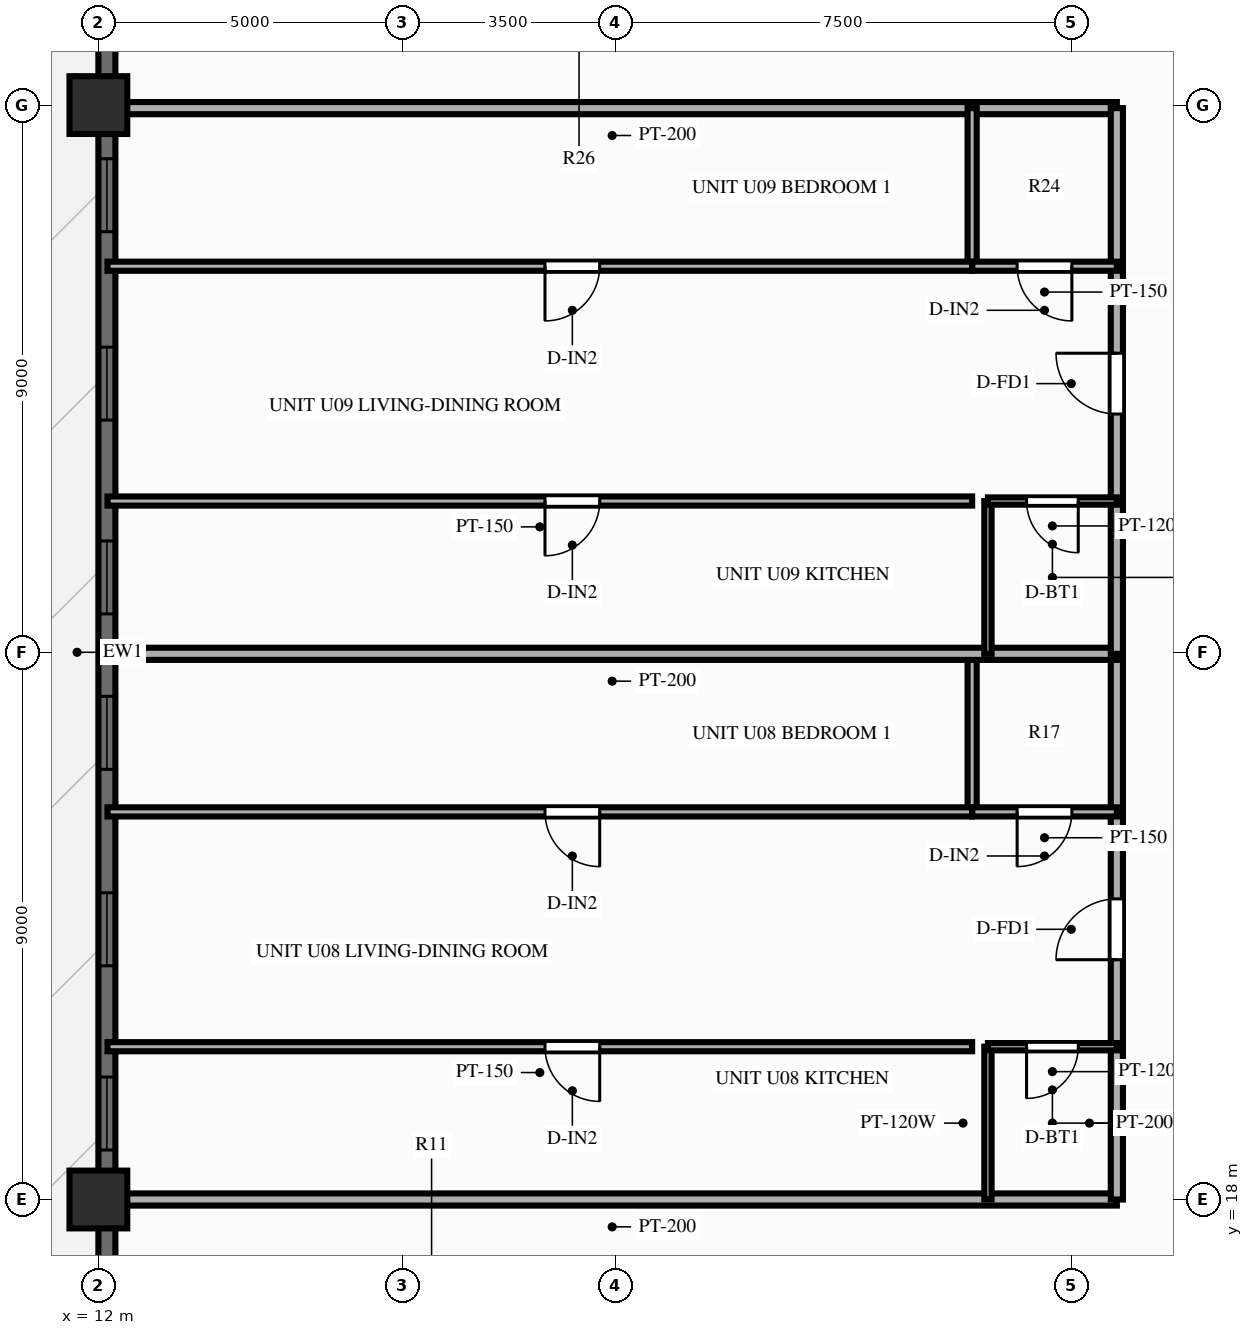
"""IFC4 building model, lengths in metres.
Left out: names, types, materials, properties, quantities, classifications, styles, units other than length and angle.
Written with IfcOpenShell. Run it as: python <this file> out.ifc"""

import sys

from ifc_helpers import new_model, si_unit, direction, frame, frame_2d, origin, origin_2d, place, context, subcontext, project, spatial, rectangle, extrude, source, transform, mapped, element, fill, save


model = new_model("IFC4")
c1 = context("Model", 3, precision=1e-05, world=origin(), true_north=direction((0.0, 1.0)))
c2 = subcontext(c1, "Body", "Model", "MODEL_VIEW")
j1 = project(units=[si_unit("LENGTHUNIT", "METRE"), si_unit("PLANEANGLEUNIT", "RADIAN")], contexts=[c1])
p1 = place(None, origin())
s1 = spatial("IfcSite", under=j1, at=p1, CompositionType="ELEMENT")
p2 = place(p1, origin())
s2 = spatial("IfcBuilding", under=s1, at=p2, CompositionType="ELEMENT")
p3 = place(p2, frame((0.0, 0.0, 80.85)))
s3 = spatial("IfcBuildingStorey", under=s2, at=p3, CompositionType="ELEMENT", Elevation=80.85)
m1 = source(origin(), c2, "Body", "SweptSolid", [
    extrude(rectangle(XDim=0.95, YDim=0.95, at=origin_2d()), origin(), (0.0, 0.0, 1.0), 3.0),
])
for number, where, z_axis, x_axis in (
    (1, (12.0, 36.0, 0.0), (0.0, 0.0, 1.0), (1.0, 0.0, 0.0)),
    (2, (12.0, 18.0, 0.0), (0.0, 0.0, 1.0), (1.0, 0.0, 0.0)),
):
    element("IfcColumn", number, at=place(p3, frame(where, z_axis=z_axis, x_axis=x_axis)), inside=s3, PredefinedType="COLUMN", context=c2, shape_type="MappedRepresentation", body=[
        mapped(m1, transform((0.0, 0.0, 0.0), scale=1.0)),
    ])
p4 = place(p3, frame((12.14, 7.2, 0.0), z_axis=(0.0, 0.0, 1.0), x_axis=(0.0, 1.0, 0.0)))
e3 = element("IfcWall", 3, at=p4, inside=s3, PredefinedType="SOLIDWALL", context=c2, shape_type="SweptSolid", body=[
    extrude(rectangle(XDim=39.6, YDim=0.28, at=frame_2d((19.8, 0.0))), origin(), (0.0, 0.0, 1.0), 2.28),
])
p5 = place(p4, frame((4.6, 0.0, 0.0)))
e4 = element("IfcOpeningElement", 4, at=p5, cuts=e3, PredefinedType="OPENING", context=c2, shape_type="SweptSolid", body=[
    extrude(rectangle(XDim=1.6, YDim=2.15, at=frame_2d((0.8, 1.075))), frame((0.0, 0.152, 0.0), z_axis=(0.0, -1.0, 0.0), x_axis=(1.0, 0.0, 0.0)), (0.0, 0.0, 1.0), 0.304),
])
p6 = place(p4, frame((11.614, 0.0, 0.25)))
e5 = element("IfcOpeningElement", 5, at=p6, cuts=e3, PredefinedType="OPENING", context=c2, shape_type="SweptSolid", body=[
    extrude(rectangle(XDim=1.2, YDim=1.5, at=frame_2d((0.6, 0.75))), frame((0.0, 0.152, 0.0), z_axis=(0.0, -1.0, 0.0), x_axis=(1.0, 0.0, 0.0)), (0.0, 0.0, 1.0), 0.304),
])
p7 = place(p4, frame((14.644, 0.0, 0.25)))
e6 = element("IfcOpeningElement", 6, at=p7, cuts=e3, PredefinedType="OPENING", context=c2, shape_type="SweptSolid", body=[
    extrude(rectangle(XDim=1.2, YDim=1.5, at=frame_2d((0.6, 0.75))), frame((0.0, 0.152, 0.0), z_axis=(0.0, -1.0, 0.0), x_axis=(1.0, 0.0, 0.0)), (0.0, 0.0, 1.0), 0.304),
])
p8 = place(p4, frame((17.875, 0.0, 0.25)))
e7 = element("IfcOpeningElement", 7, at=p8, cuts=e3, PredefinedType="OPENING", context=c2, shape_type="SweptSolid", body=[
    extrude(rectangle(XDim=1.2, YDim=1.5, at=frame_2d((0.6, 0.75))), frame((0.0, 0.152, 0.0), z_axis=(0.0, -1.0, 0.0), x_axis=(1.0, 0.0, 0.0)), (0.0, 0.0, 1.0), 0.304),
])
p9 = place(p4, frame((20.431, 0.0, 0.25)))
e8 = element("IfcOpeningElement", 8, at=p9, cuts=e3, PredefinedType="OPENING", context=c2, shape_type="SweptSolid", body=[
    extrude(rectangle(XDim=1.2, YDim=1.5, at=frame_2d((0.6, 0.75))), frame((0.0, 0.152, 0.0), z_axis=(0.0, -1.0, 0.0), x_axis=(1.0, 0.0, 0.0)), (0.0, 0.0, 1.0), 0.304),
])
p10 = place(p4, frame((23.619, 0.0, 0.25)))
e9 = element("IfcOpeningElement", 9, at=p10, cuts=e3, PredefinedType="OPENING", context=c2, shape_type="SweptSolid", body=[
    extrude(rectangle(XDim=1.2, YDim=1.5, at=frame_2d((0.6, 0.75))), frame((0.0, 0.152, 0.0), z_axis=(0.0, -1.0, 0.0), x_axis=(1.0, 0.0, 0.0)), (0.0, 0.0, 1.0), 0.304),
])
p11 = place(p4, frame((26.718, 0.0, 0.25)))
e10 = element("IfcOpeningElement", 10, at=p11, cuts=e3, PredefinedType="OPENING", context=c2, shape_type="SweptSolid", body=[
    extrude(rectangle(XDim=1.2, YDim=1.5, at=frame_2d((0.6, 0.75))), frame((0.0, 0.152, 0.0), z_axis=(0.0, -1.0, 0.0), x_axis=(1.0, 0.0, 0.0)), (0.0, 0.0, 1.0), 0.304),
])
p12 = place(p4, frame((33.6, 0.0, 0.25)))
e11 = element("IfcOpeningElement", 11, at=p12, cuts=e3, PredefinedType="OPENING", context=c2, shape_type="SweptSolid", body=[
    extrude(rectangle(XDim=1.2, YDim=1.5, at=frame_2d((0.6, 0.75))), frame((0.0, 0.152, 0.0), z_axis=(0.0, -1.0, 0.0), x_axis=(1.0, 0.0, 0.0)), (0.0, 0.0, 1.0), 0.304),
])
for number, where, z_axis, x_axis in (
    (12, (28.75, 18.0, 0.0), (0.0, 0.0, 1.0), (-1.0, 0.0, 0.0)),
    (13, (28.75, 35.95, 0.0), (0.0, 0.0, 1.0), (-1.0, 0.0, 0.0)),
):
    element("IfcWall", number, at=place(p3, frame(where, z_axis=z_axis, x_axis=x_axis)), inside=s3, PredefinedType="PARTITIONING", context=c2, shape_type="SweptSolid", body=[
        extrude(rectangle(XDim=16.6, YDim=0.2, at=frame_2d((8.3, 0.0))), origin(), (0.0, 0.0, 1.0), 2.34),
    ])
p13 = place(p3, frame((28.75, 18.0, 0.0), z_axis=(0.0, 0.0, 1.0), x_axis=(0.0, 1.0, 0.0)))
e14 = element("IfcWall", 14, at=p13, inside=s3, PredefinedType="PARTITIONING", context=c2, shape_type="SweptSolid", body=[
    extrude(rectangle(XDim=2.513, YDim=0.2, at=frame_2d((1.256, 0.0))), origin(), (0.0, 0.0, 1.0), 2.79),
])
p14 = place(p3, frame((28.75, 20.513, 0.0), z_axis=(0.0, 0.0, 1.0), x_axis=(0.0, 1.0, 0.0)))
e15 = element("IfcWall", 15, at=p14, inside=s3, PredefinedType="PARTITIONING", context=c2, shape_type="SweptSolid", body=[
    extrude(rectangle(XDim=3.862, YDim=0.2, at=frame_2d((1.931, 0.0))), origin(), (0.0, 0.0, 1.0), 2.79),
])
p15 = place(p14, frame((1.431, 0.0, 0.0)))
e16 = element("IfcOpeningElement", 16, at=p15, cuts=e15, PredefinedType="OPENING", context=c2, shape_type="SweptSolid", body=[
    extrude(rectangle(XDim=1.0, YDim=2.15, at=frame_2d((0.5, 1.075))), frame((0.0, 0.112, 0.0), z_axis=(0.0, -1.0, 0.0), x_axis=(1.0, 0.0, 0.0)), (0.0, 0.0, 1.0), 0.224),
])
p16 = place(p3, frame((28.75, 24.375, 0.0), z_axis=(0.0, 0.0, 1.0), x_axis=(0.0, 1.0, 0.0)))
e17 = element("IfcWall", 17, at=p16, inside=s3, PredefinedType="PARTITIONING", context=c2, shape_type="SweptSolid", body=[
    extrude(rectangle(XDim=2.6, YDim=0.2, at=frame_2d((1.3, 0.0))), origin(), (0.0, 0.0, 1.0), 2.79),
])
p17 = place(p3, frame((26.63, 18.0, 0.0), z_axis=(0.0, 0.0, 1.0), x_axis=(0.0, 1.0, 0.0)))
e18 = element("IfcWall", 18, at=p17, inside=s3, PredefinedType="PARTITIONING", context=c2, shape_type="SweptSolid", body=[
    extrude(rectangle(XDim=2.513, YDim=0.12, at=frame_2d((1.256, 0.0))), origin(), (0.0, 0.0, 1.0), 2.79),
])
p18 = place(p3, frame((26.37, 24.375, 0.0), z_axis=(0.0, 0.0, 1.0), x_axis=(0.0, 1.0, 0.0)))
e19 = element("IfcWall", 19, at=p18, inside=s3, PredefinedType="PARTITIONING", context=c2, shape_type="SweptSolid", body=[
    extrude(rectangle(XDim=2.6, YDim=0.15, at=frame_2d((1.3, 0.0))), origin(), (0.0, 0.0, 1.0), 2.79),
])
p19 = place(p3, frame((28.75, 20.513, 0.0), z_axis=(0.0, 0.0, 1.0), x_axis=(-1.0, 0.0, 0.0)))
e20 = element("IfcWall", 20, at=p19, inside=s3, PredefinedType="PARTITIONING", context=c2, shape_type="SweptSolid", body=[
    extrude(rectangle(XDim=2.12, YDim=0.12, at=frame_2d((1.06, 0.0))), origin(), (0.0, 0.0, 1.0), 2.79),
])
p20 = place(p19, frame((0.635, 0.0, 0.0)))
e21 = element("IfcOpeningElement", 21, at=p20, cuts=e20, PredefinedType="OPENING", context=c2, shape_type="SweptSolid", body=[
    extrude(rectangle(XDim=0.85, YDim=2.05, at=frame_2d((0.425, 1.025))), frame((0.0, 0.072, 0.0), z_axis=(0.0, -1.0, 0.0), x_axis=(1.0, 0.0, 0.0)), (0.0, 0.0, 1.0), 0.144),
])
p21 = place(p3, frame((26.37, 20.513, 0.0), z_axis=(0.0, 0.0, 1.0), x_axis=(-1.0, 0.0, 0.0)))
e22 = element("IfcWall", 22, at=p21, inside=s3, PredefinedType="PARTITIONING", context=c2, shape_type="SweptSolid", body=[
    extrude(rectangle(XDim=14.22, YDim=0.15, at=frame_2d((7.11, 0.0))), origin(), (0.0, 0.0, 1.0), 2.79),
])
p22 = place(p21, frame((6.125, 0.0, 0.0)))
e23 = element("IfcOpeningElement", 23, at=p22, cuts=e22, PredefinedType="OPENING", context=c2, shape_type="SweptSolid", body=[
    extrude(rectangle(XDim=0.9, YDim=2.1, at=frame_2d((0.45, 1.05))), frame((0.0, 0.087, 0.0), z_axis=(0.0, -1.0, 0.0), x_axis=(1.0, 0.0, 0.0)), (0.0, 0.0, 1.0), 0.174),
])
p23 = place(p3, frame((28.75, 24.375, 0.0), z_axis=(0.0, 0.0, 1.0), x_axis=(-1.0, 0.0, 0.0)))
e24 = element("IfcWall", 24, at=p23, inside=s3, PredefinedType="PARTITIONING", context=c2, shape_type="SweptSolid", body=[
    extrude(rectangle(XDim=2.38, YDim=0.15, at=frame_2d((1.19, 0.0))), origin(), (0.0, 0.0, 1.0), 2.79),
])
p24 = place(p23, frame((0.74, 0.0, 0.0)))
e25 = element("IfcOpeningElement", 25, at=p24, cuts=e24, PredefinedType="OPENING", context=c2, shape_type="SweptSolid", body=[
    extrude(rectangle(XDim=0.9, YDim=2.1, at=frame_2d((0.45, 1.05))), frame((0.0, 0.087, 0.0), z_axis=(0.0, -1.0, 0.0), x_axis=(1.0, 0.0, 0.0)), (0.0, 0.0, 1.0), 0.174),
])
p25 = place(p3, frame((26.37, 24.375, 0.0), z_axis=(0.0, 0.0, 1.0), x_axis=(-1.0, 0.0, 0.0)))
e26 = element("IfcWall", 26, at=p25, inside=s3, PredefinedType="PARTITIONING", context=c2, shape_type="SweptSolid", body=[
    extrude(rectangle(XDim=14.22, YDim=0.15, at=frame_2d((7.11, 0.0))), origin(), (0.0, 0.0, 1.0), 2.79),
])
p26 = place(p25, frame((6.125, 0.0, 0.0)))
e27 = element("IfcOpeningElement", 27, at=p26, cuts=e26, PredefinedType="OPENING", context=c2, shape_type="SweptSolid", body=[
    extrude(rectangle(XDim=0.9, YDim=2.1, at=frame_2d((0.45, 1.05))), frame((0.0, 0.087, 0.0), z_axis=(0.0, -1.0, 0.0), x_axis=(1.0, 0.0, 0.0)), (0.0, 0.0, 1.0), 0.174),
])
p27 = place(p3, frame((28.75, 26.975, 0.0), z_axis=(0.0, 0.0, 1.0), x_axis=(-1.0, 0.0, 0.0)))
e28 = element("IfcWall", 28, at=p27, inside=s3, PredefinedType="PARTITIONING", context=c2, shape_type="SweptSolid", body=[
    extrude(rectangle(XDim=16.6, YDim=0.2, at=frame_2d((8.3, 0.0))), origin(), (0.0, 0.0, 1.0), 2.79),
])
p28 = place(p3, frame((28.75, 26.975, 0.0), z_axis=(0.0, 0.0, 1.0), x_axis=(0.0, 1.0, 0.0)))
e29 = element("IfcWall", 29, at=p28, inside=s3, PredefinedType="PARTITIONING", context=c2, shape_type="SweptSolid", body=[
    extrude(rectangle(XDim=2.513, YDim=0.2, at=frame_2d((1.256, 0.0))), origin(), (0.0, 0.0, 1.0), 2.79),
])
p29 = place(p3, frame((28.75, 29.488, 0.0), z_axis=(0.0, 0.0, 1.0), x_axis=(0.0, 1.0, 0.0)))
e30 = element("IfcWall", 30, at=p29, inside=s3, PredefinedType="PARTITIONING", context=c2, shape_type="SweptSolid", body=[
    extrude(rectangle(XDim=3.862, YDim=0.2, at=frame_2d((1.931, 0.0))), origin(), (0.0, 0.0, 1.0), 2.79),
])
p30 = place(p29, frame((1.431, 0.0, 0.0)))
e31 = element("IfcOpeningElement", 31, at=p30, cuts=e30, PredefinedType="OPENING", context=c2, shape_type="SweptSolid", body=[
    extrude(rectangle(XDim=1.0, YDim=2.15, at=frame_2d((0.5, 1.075))), frame((0.0, 0.112, 0.0), z_axis=(0.0, -1.0, 0.0), x_axis=(1.0, 0.0, 0.0)), (0.0, 0.0, 1.0), 0.224),
])
p31 = place(p3, frame((28.75, 33.35, 0.0), z_axis=(0.0, 0.0, 1.0), x_axis=(0.0, 1.0, 0.0)))
e32 = element("IfcWall", 32, at=p31, inside=s3, PredefinedType="PARTITIONING", context=c2, shape_type="SweptSolid", body=[
    extrude(rectangle(XDim=2.6, YDim=0.2, at=frame_2d((1.3, 0.0))), origin(), (0.0, 0.0, 1.0), 2.79),
])
p32 = place(p3, frame((26.63, 26.975, 0.0), z_axis=(0.0, 0.0, 1.0), x_axis=(0.0, 1.0, 0.0)))
e33 = element("IfcWall", 33, at=p32, inside=s3, PredefinedType="PARTITIONING", context=c2, shape_type="SweptSolid", body=[
    extrude(rectangle(XDim=2.513, YDim=0.12, at=frame_2d((1.256, 0.0))), origin(), (0.0, 0.0, 1.0), 2.79),
])
p33 = place(p3, frame((26.37, 33.35, 0.0), z_axis=(0.0, 0.0, 1.0), x_axis=(0.0, 1.0, 0.0)))
e34 = element("IfcWall", 34, at=p33, inside=s3, PredefinedType="PARTITIONING", context=c2, shape_type="SweptSolid", body=[
    extrude(rectangle(XDim=2.6, YDim=0.15, at=frame_2d((1.3, 0.0))), origin(), (0.0, 0.0, 1.0), 2.79),
])
p34 = place(p3, frame((28.75, 29.488, 0.0), z_axis=(0.0, 0.0, 1.0), x_axis=(-1.0, 0.0, 0.0)))
e35 = element("IfcWall", 35, at=p34, inside=s3, PredefinedType="PARTITIONING", context=c2, shape_type="SweptSolid", body=[
    extrude(rectangle(XDim=2.12, YDim=0.12, at=frame_2d((1.06, 0.0))), origin(), (0.0, 0.0, 1.0), 2.79),
])
p35 = place(p34, frame((0.635, 0.0, 0.0)))
e36 = element("IfcOpeningElement", 36, at=p35, cuts=e35, PredefinedType="OPENING", context=c2, shape_type="SweptSolid", body=[
    extrude(rectangle(XDim=0.85, YDim=2.05, at=frame_2d((0.425, 1.025))), frame((0.0, 0.072, 0.0), z_axis=(0.0, -1.0, 0.0), x_axis=(1.0, 0.0, 0.0)), (0.0, 0.0, 1.0), 0.144),
])
p36 = place(p3, frame((26.37, 29.488, 0.0), z_axis=(0.0, 0.0, 1.0), x_axis=(-1.0, 0.0, 0.0)))
e37 = element("IfcWall", 37, at=p36, inside=s3, PredefinedType="PARTITIONING", context=c2, shape_type="SweptSolid", body=[
    extrude(rectangle(XDim=14.22, YDim=0.15, at=frame_2d((7.11, 0.0))), origin(), (0.0, 0.0, 1.0), 2.79),
])
p37 = place(p36, frame((6.125, 0.0, 0.0)))
e38 = element("IfcOpeningElement", 38, at=p37, cuts=e37, PredefinedType="OPENING", context=c2, shape_type="SweptSolid", body=[
    extrude(rectangle(XDim=0.9, YDim=2.1, at=frame_2d((0.45, 1.05))), frame((0.0, 0.087, 0.0), z_axis=(0.0, -1.0, 0.0), x_axis=(1.0, 0.0, 0.0)), (0.0, 0.0, 1.0), 0.174),
])
p38 = place(p3, frame((28.75, 33.35, 0.0), z_axis=(0.0, 0.0, 1.0), x_axis=(-1.0, 0.0, 0.0)))
e39 = element("IfcWall", 39, at=p38, inside=s3, PredefinedType="PARTITIONING", context=c2, shape_type="SweptSolid", body=[
    extrude(rectangle(XDim=2.38, YDim=0.15, at=frame_2d((1.19, 0.0))), origin(), (0.0, 0.0, 1.0), 2.79),
])
p39 = place(p38, frame((0.74, 0.0, 0.0)))
e40 = element("IfcOpeningElement", 40, at=p39, cuts=e39, PredefinedType="OPENING", context=c2, shape_type="SweptSolid", body=[
    extrude(rectangle(XDim=0.9, YDim=2.1, at=frame_2d((0.45, 1.05))), frame((0.0, 0.087, 0.0), z_axis=(0.0, -1.0, 0.0), x_axis=(1.0, 0.0, 0.0)), (0.0, 0.0, 1.0), 0.174),
])
p40 = place(p3, frame((26.37, 33.35, 0.0), z_axis=(0.0, 0.0, 1.0), x_axis=(-1.0, 0.0, 0.0)))
e41 = element("IfcWall", 41, at=p40, inside=s3, PredefinedType="PARTITIONING", context=c2, shape_type="SweptSolid", body=[
    extrude(rectangle(XDim=14.22, YDim=0.15, at=frame_2d((7.11, 0.0))), origin(), (0.0, 0.0, 1.0), 2.79),
])
p41 = place(p40, frame((6.125, 0.0, 0.0)))
e42 = element("IfcOpeningElement", 42, at=p41, cuts=e41, PredefinedType="OPENING", context=c2, shape_type="SweptSolid", body=[
    extrude(rectangle(XDim=0.9, YDim=2.1, at=frame_2d((0.45, 1.05))), frame((0.0, 0.087, 0.0), z_axis=(0.0, -1.0, 0.0), x_axis=(1.0, 0.0, 0.0)), (0.0, 0.0, 1.0), 0.174),
])
m2 = source(origin(), c2, "Body", "SweptSolid", [
    extrude(rectangle(XDim=1.2, YDim=1.5, at=frame_2d((0.6, 0.75))), frame((0.0, 0.03, 0.0), z_axis=(0.0, -1.0, 0.0), x_axis=(1.0, 0.0, 0.0)), (0.0, 0.0, 1.0), 0.06),
])
p42 = place(p6, origin())
e43 = element("IfcWindow", 43, at=p42, inside=s3, PartitioningType="SINGLE_PANEL", PredefinedType="WINDOW", context=c2, shape_type="MappedRepresentation", body=[
    mapped(m2, transform((0.0, 0.0, 0.0), scale=1.0)),
])
fill(e5, e43)
p43 = place(p7, origin())
e44 = element("IfcWindow", 44, at=p43, inside=s3, PartitioningType="SINGLE_PANEL", PredefinedType="WINDOW", context=c2, shape_type="MappedRepresentation", body=[
    mapped(m2, transform((0.0, 0.0, 0.0), scale=1.0)),
])
fill(e6, e44)
p44 = place(p8, origin())
e45 = element("IfcWindow", 45, at=p44, inside=s3, PartitioningType="SINGLE_PANEL", PredefinedType="WINDOW", context=c2, shape_type="MappedRepresentation", body=[
    mapped(m2, transform((0.0, 0.0, 0.0), scale=1.0)),
])
fill(e7, e45)
p45 = place(p9, origin())
e46 = element("IfcWindow", 46, at=p45, inside=s3, PartitioningType="SINGLE_PANEL", PredefinedType="WINDOW", context=c2, shape_type="MappedRepresentation", body=[
    mapped(m2, transform((0.0, 0.0, 0.0), scale=1.0)),
])
fill(e8, e46)
p46 = place(p10, origin())
e47 = element("IfcWindow", 47, at=p46, inside=s3, PartitioningType="SINGLE_PANEL", PredefinedType="WINDOW", context=c2, shape_type="MappedRepresentation", body=[
    mapped(m2, transform((0.0, 0.0, 0.0), scale=1.0)),
])
fill(e9, e47)
p47 = place(p11, origin())
e48 = element("IfcWindow", 48, at=p47, inside=s3, PartitioningType="SINGLE_PANEL", PredefinedType="WINDOW", context=c2, shape_type="MappedRepresentation", body=[
    mapped(m2, transform((0.0, 0.0, 0.0), scale=1.0)),
])
fill(e10, e48)
m3 = source(origin(), c2, "Body", "SweptSolid", [
    extrude(rectangle(XDim=1.0, YDim=2.15, at=frame_2d((0.5, 1.075))), frame((0.0, 0.025, 0.0), z_axis=(0.0, -1.0, 0.0), x_axis=(1.0, 0.0, 0.0)), (0.0, 0.0, 1.0), 0.05),
])
p48 = place(p15, origin())
e49 = element("IfcDoor", 49, at=p48, inside=s3, OperationType="SINGLE_SWING_LEFT", PredefinedType="DOOR", context=c2, shape_type="MappedRepresentation", body=[
    mapped(m3, transform((0.0, 0.0, 0.0), scale=1.0)),
])
fill(e16, e49)
m4 = source(origin(), c2, "Body", "SweptSolid", [
    extrude(rectangle(XDim=0.85, YDim=2.05, at=frame_2d((0.425, 1.025))), frame((0.0, 0.025, 0.0), z_axis=(0.0, -1.0, 0.0), x_axis=(1.0, 0.0, 0.0)), (0.0, 0.0, 1.0), 0.05),
])
p49 = place(p20, origin())
e50 = element("IfcDoor", 50, at=p49, inside=s3, OperationType="SINGLE_SWING_RIGHT", PredefinedType="DOOR", context=c2, shape_type="MappedRepresentation", body=[
    mapped(m4, transform((0.0, 0.0, 0.0), scale=1.0)),
])
fill(e21, e50)
m5 = source(origin(), c2, "Body", "SweptSolid", [
    extrude(rectangle(XDim=0.9, YDim=2.1, at=frame_2d((0.45, 1.05))), frame((0.0, 0.025, 0.0), z_axis=(0.0, -1.0, 0.0), x_axis=(1.0, 0.0, 0.0)), (0.0, 0.0, 1.0), 0.05),
])
p50 = place(p22, origin())
e51 = element("IfcDoor", 51, at=p50, inside=s3, OperationType="SINGLE_SWING_LEFT", PredefinedType="DOOR", context=c2, shape_type="MappedRepresentation", body=[
    mapped(m5, transform((0.0, 0.0, 0.0), scale=1.0)),
])
fill(e23, e51)
p51 = place(p24, origin())
e52 = element("IfcDoor", 52, at=p51, inside=s3, OperationType="SINGLE_SWING_RIGHT", PredefinedType="DOOR", context=c2, shape_type="MappedRepresentation", body=[
    mapped(m5, transform((0.0, 0.0, 0.0), scale=1.0)),
])
fill(e25, e52)
p52 = place(p26, origin())
e53 = element("IfcDoor", 53, at=p52, inside=s3, OperationType="SINGLE_SWING_LEFT", PredefinedType="DOOR", context=c2, shape_type="MappedRepresentation", body=[
    mapped(m5, transform((0.0, 0.0, 0.0), scale=1.0)),
])
fill(e27, e53)
p53 = place(p30, origin())
e54 = element("IfcDoor", 54, at=p53, inside=s3, OperationType="SINGLE_SWING_RIGHT", PredefinedType="DOOR", context=c2, shape_type="MappedRepresentation", body=[
    mapped(m3, transform((0.0, 0.0, 0.0), scale=1.0)),
])
fill(e31, e54)
p54 = place(p35, origin())
e55 = element("IfcDoor", 55, at=p54, inside=s3, OperationType="SINGLE_SWING_LEFT", PredefinedType="DOOR", context=c2, shape_type="MappedRepresentation", body=[
    mapped(m4, transform((0.0, 0.0, 0.0), scale=1.0)),
])
fill(e36, e55)
p55 = place(p37, origin())
e56 = element("IfcDoor", 56, at=p55, inside=s3, OperationType="SINGLE_SWING_RIGHT", PredefinedType="DOOR", context=c2, shape_type="MappedRepresentation", body=[
    mapped(m5, transform((0.0, 0.0, 0.0), scale=1.0)),
])
fill(e38, e56)
p56 = place(p39, origin())
e57 = element("IfcDoor", 57, at=p56, inside=s3, OperationType="SINGLE_SWING_LEFT", PredefinedType="DOOR", context=c2, shape_type="MappedRepresentation", body=[
    mapped(m5, transform((0.0, 0.0, 0.0), scale=1.0)),
])
fill(e40, e57)
p57 = place(p41, origin())
e58 = element("IfcDoor", 58, at=p57, inside=s3, OperationType="SINGLE_SWING_RIGHT", PredefinedType="DOOR", context=c2, shape_type="MappedRepresentation", body=[
    mapped(m5, transform((0.0, 0.0, 0.0), scale=1.0)),
])
fill(e42, e58)
save(model, sys.argv[1])
